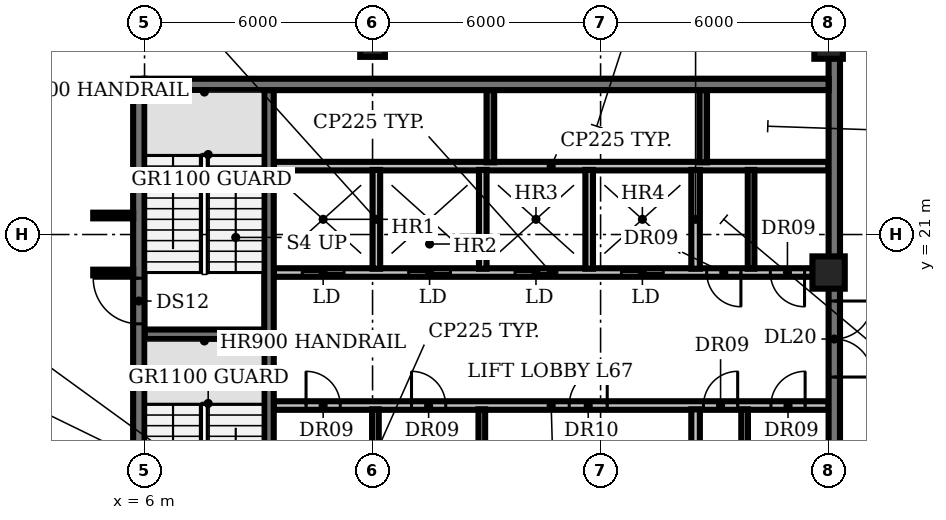
"""IFC4 building model, lengths in metres.
Left out: names, types, materials, properties, quantities, classifications, styles, units other than length and angle.
Written with IfcOpenShell. Run it as: python <this file> out.ifc"""

import sys

from ifc_helpers import new_model, si_unit, direction, frame, frame_2d, origin, origin_2d, place, context, subcontext, project, spatial, rectangle, circle, extrude, element, fill, save


model = new_model("IFC4")
c1 = context("Model", 3, precision=1e-05, world=origin(), true_north=direction((0.0, 1.0)))
c2 = subcontext(c1, "Body", "Model", "MODEL_VIEW")
j1 = project(units=[si_unit("LENGTHUNIT", "METRE"), si_unit("PLANEANGLEUNIT", "RADIAN")], contexts=[c1])
p1 = place(None, origin())
s1 = spatial("IfcSite", under=j1, at=p1, CompositionType="ELEMENT")
p2 = place(p1, origin())
s2 = spatial("IfcBuilding", under=s1, at=p2, CompositionType="ELEMENT")
p3 = place(p2, frame((0.0, 0.0, 302.0)))
s3 = spatial("IfcBuildingStorey", under=s2, at=p3, CompositionType="ELEMENT", Elevation=302.0)
p4 = place(p3, frame((12.0, 26.0, 0.0), z_axis=(0.0, 0.0, 1.0), x_axis=(1.0, 0.0, 0.0)))
e1 = element("IfcColumn", 1, at=p4, inside=s3, PredefinedType="COLUMN", context=c2, shape_type="SweptSolid", body=[
    extrude(rectangle(XDim=0.65, YDim=0.65, at=origin_2d()), origin(), (0.0, 0.0, 1.0), 3.85),
])
p5 = place(p3, frame((24.0, 20.0, 0.0), z_axis=(0.0, 0.0, 1.0), x_axis=(1.0, 0.0, 0.0)))
e2 = element("IfcColumn", 2, at=p5, inside=s3, PredefinedType="COLUMN", context=c2, shape_type="SweptSolid", body=[
    extrude(circle(Radius=0.425, at=origin_2d()), origin(), (0.0, 0.0, 1.0), 3.85),
])
p6 = place(p3, frame((24.0, 26.0, 0.0), z_axis=(0.0, 0.0, 1.0), x_axis=(1.0, 0.0, 0.0)))
e3 = element("IfcColumn", 3, at=p6, inside=s3, PredefinedType="COLUMN", context=c2, shape_type="SweptSolid", body=[
    extrude(rectangle(XDim=0.75, YDim=0.75, at=origin_2d()), origin(), (0.0, 0.0, 1.0), 3.85),
])
p7 = place(p3, frame((9.4, 16.5, 0.0), z_axis=(0.0, 0.0, 1.0), x_axis=(1.0, 0.0, 0.0)))
e4 = element("IfcWall", 4, at=p7, inside=s3, PredefinedType="PARTITIONING", context=c2, shape_type="SweptSolid", body=[
    extrude(rectangle(XDim=14.6, YDim=0.225, at=frame_2d((7.3, 0.0))), origin(), (0.0, 0.0, 1.0), 3.85),
])
p8 = place(p7, frame((0.85, 0.0, 0.0)))
e5 = element("IfcOpeningElement", 5, at=p8, cuts=e4, PredefinedType="OPENING", context=c2, shape_type="SweptSolid", body=[
    extrude(rectangle(XDim=0.9, YDim=2.1, at=frame_2d((0.45, 1.05))), frame((0.0, 0.123, 0.0), z_axis=(0.0, -1.0, 0.0), x_axis=(1.0, 0.0, 0.0)), (0.0, 0.0, 1.0), 0.245),
])
p9 = place(p7, frame((3.625, 0.0, 0.0)))
e6 = element("IfcOpeningElement", 6, at=p9, cuts=e4, PredefinedType="OPENING", context=c2, shape_type="SweptSolid", body=[
    extrude(rectangle(XDim=0.9, YDim=2.1, at=frame_2d((0.45, 1.05))), frame((0.0, 0.123, 0.0), z_axis=(0.0, -1.0, 0.0), x_axis=(1.0, 0.0, 0.0)), (0.0, 0.0, 1.0), 0.245),
])
p10 = place(p7, frame((7.775, 0.0, 0.0)))
e7 = element("IfcOpeningElement", 7, at=p10, cuts=e4, PredefinedType="OPENING", context=c2, shape_type="SweptSolid", body=[
    extrude(rectangle(XDim=1.0, YDim=2.1, at=frame_2d((0.5, 1.05))), frame((0.0, 0.123, 0.0), z_axis=(0.0, -1.0, 0.0), x_axis=(1.0, 0.0, 0.0)), (0.0, 0.0, 1.0), 0.245),
])
p11 = place(p7, frame((11.308, 0.0, 0.0)))
e8 = element("IfcOpeningElement", 8, at=p11, cuts=e4, PredefinedType="OPENING", context=c2, shape_type="SweptSolid", body=[
    extrude(rectangle(XDim=0.9, YDim=2.1, at=frame_2d((0.45, 1.05))), frame((0.0, 0.123, 0.0), z_axis=(0.0, -1.0, 0.0), x_axis=(1.0, 0.0, 0.0)), (0.0, 0.0, 1.0), 0.245),
])
p12 = place(p7, frame((13.083, 0.0, 0.0)))
e9 = element("IfcOpeningElement", 9, at=p12, cuts=e4, PredefinedType="OPENING", context=c2, shape_type="SweptSolid", body=[
    extrude(rectangle(XDim=0.9, YDim=2.1, at=frame_2d((0.45, 1.05))), frame((0.0, 0.123, 0.0), z_axis=(0.0, -1.0, 0.0), x_axis=(1.0, 0.0, 0.0)), (0.0, 0.0, 1.0), 0.245),
])
p13 = place(p3, frame((6.0, 18.375, 0.0), z_axis=(0.0, 0.0, 1.0), x_axis=(1.0, 0.0, 0.0)))
e10 = element("IfcWall", 10, at=p13, inside=s3, PredefinedType="SHEAR", context=c2, shape_type="SweptSolid", body=[
    extrude(rectangle(XDim=3.15, YDim=0.25, at=frame_2d((1.575, 0.0))), origin(), (0.0, 0.0, 1.0), 3.85),
])
p14 = place(p3, frame((24.0, 20.0, 0.0), z_axis=(0.0, 0.0, 1.0), x_axis=(-1.0, 0.0, 0.0)))
e11 = element("IfcWall", 11, at=p14, inside=s3, PredefinedType="PARTITIONING", context=c2, shape_type="SweptSolid", body=[
    extrude(rectangle(XDim=14.6, YDim=0.225, at=frame_2d((7.3, 0.0))), origin(), (0.0, 0.0, 1.0), 3.85),
])
p15 = place(p14, frame((12.75, 0.0, 0.0)))
e12 = element("IfcOpeningElement", 12, at=p15, cuts=e11, PredefinedType="OPENING", context=c2, shape_type="SweptSolid", body=[
    extrude(rectangle(XDim=1.1, YDim=2.1, at=frame_2d((0.55, 1.05))), frame((0.0, 0.123, 0.0), z_axis=(0.0, -1.0, 0.0), x_axis=(1.0, 0.0, 0.0)), (0.0, 0.0, 1.0), 0.245),
])
p16 = place(p14, frame((9.95, 0.0, 0.0)))
e13 = element("IfcOpeningElement", 13, at=p16, cuts=e11, PredefinedType="OPENING", context=c2, shape_type="SweptSolid", body=[
    extrude(rectangle(XDim=1.1, YDim=2.1, at=frame_2d((0.55, 1.05))), frame((0.0, 0.123, 0.0), z_axis=(0.0, -1.0, 0.0), x_axis=(1.0, 0.0, 0.0)), (0.0, 0.0, 1.0), 0.245),
])
p17 = place(p14, frame((7.15, 0.0, 0.0)))
e14 = element("IfcOpeningElement", 14, at=p17, cuts=e11, PredefinedType="OPENING", context=c2, shape_type="SweptSolid", body=[
    extrude(rectangle(XDim=1.1, YDim=2.1, at=frame_2d((0.55, 1.05))), frame((0.0, 0.123, 0.0), z_axis=(0.0, -1.0, 0.0), x_axis=(1.0, 0.0, 0.0)), (0.0, 0.0, 1.0), 0.245),
])
p18 = place(p14, frame((4.35, 0.0, 0.0)))
e15 = element("IfcOpeningElement", 15, at=p18, cuts=e11, PredefinedType="OPENING", context=c2, shape_type="SweptSolid", body=[
    extrude(rectangle(XDim=1.1, YDim=2.1, at=frame_2d((0.55, 1.05))), frame((0.0, 0.123, 0.0), z_axis=(0.0, -1.0, 0.0), x_axis=(1.0, 0.0, 0.0)), (0.0, 0.0, 1.0), 0.245),
])
p19 = place(p14, frame((2.308, 0.0, 0.0)))
e16 = element("IfcOpeningElement", 16, at=p19, cuts=e11, PredefinedType="OPENING", context=c2, shape_type="SweptSolid", body=[
    extrude(rectangle(XDim=0.9, YDim=2.1, at=frame_2d((0.45, 1.05))), frame((0.0, 0.123, 0.0), z_axis=(0.0, -1.0, 0.0), x_axis=(1.0, 0.0, 0.0)), (0.0, 0.0, 1.0), 0.245),
])
p20 = place(p14, frame((0.633, 0.0, 0.0)))
e17 = element("IfcOpeningElement", 17, at=p20, cuts=e11, PredefinedType="OPENING", context=c2, shape_type="SweptSolid", body=[
    extrude(rectangle(XDim=0.9, YDim=2.1, at=frame_2d((0.45, 1.05))), frame((0.0, 0.123, 0.0), z_axis=(0.0, -1.0, 0.0), x_axis=(1.0, 0.0, 0.0)), (0.0, 0.0, 1.0), 0.245),
])
p21 = place(p3, frame((9.4, 22.8, 0.0), z_axis=(0.0, 0.0, 1.0), x_axis=(1.0, 0.0, 0.0)))
e18 = element("IfcWall", 18, at=p21, inside=s3, PredefinedType="PARTITIONING", context=c2, shape_type="SweptSolid", body=[
    extrude(rectangle(XDim=14.6, YDim=0.225, at=frame_2d((7.3, 0.0))), origin(), (0.0, 0.0, 1.0), 3.85),
])
p22 = place(p3, frame((9.275, 18.375, 0.0), z_axis=(0.0, 0.0, 1.0), x_axis=(0.0, -1.0, 0.0)))
e19 = element("IfcWall", 19, at=p22, inside=s3, PredefinedType="SHEAR", context=c2, shape_type="SweptSolid", body=[
    extrude(rectangle(XDim=6.55, YDim=0.25, at=frame_2d((3.275, 0.0))), origin(), (0.0, 0.0, 1.0), 3.85),
])
p23 = place(p22, frame((5.075, 0.0, 0.0)))
e20 = element("IfcOpeningElement", 20, at=p23, cuts=e19, PredefinedType="OPENING", context=c2, shape_type="SweptSolid", body=[
    extrude(rectangle(XDim=1.0, YDim=2.1, at=frame_2d((0.5, 1.05))), frame((0.0, 0.135, 0.0), z_axis=(0.0, -1.0, 0.0), x_axis=(1.0, 0.0, 0.0)), (0.0, 0.0, 1.0), 0.27),
])
p24 = place(p3, frame((9.275, 18.375, 0.0), z_axis=(0.0, 0.0, 1.0), x_axis=(0.0, 1.0, 0.0)))
e21 = element("IfcWall", 21, at=p24, inside=s3, PredefinedType="SHEAR", context=c2, shape_type="SweptSolid", body=[
    extrude(rectangle(XDim=6.425, YDim=0.25, at=frame_2d((3.212, 0.0))), origin(), (0.0, 0.0, 1.0), 3.85),
])
p25 = place(p3, frame((12.075, 13.8, 0.0), z_axis=(0.0, 0.0, 1.0), x_axis=(0.0, 1.0, 0.0)))
e22 = element("IfcWall", 22, at=p25, inside=s3, PredefinedType="PARTITIONING", context=c2, shape_type="SweptSolid", body=[
    extrude(rectangle(XDim=2.6, YDim=0.175, at=frame_2d((1.3, 0.0))), origin(), (0.0, 0.0, 1.0), 3.85),
])
p26 = place(p3, frame((12.1, 20.1, 0.0), z_axis=(0.0, 0.0, 1.0), x_axis=(0.0, 1.0, 0.0)))
e23 = element("IfcWall", 23, at=p26, inside=s3, PredefinedType="SOLIDWALL", context=c2, shape_type="SweptSolid", body=[
    extrude(rectangle(XDim=2.6, YDim=0.2, at=frame_2d((1.3, 0.0))), origin(), (0.0, 0.0, 1.0), 3.85),
])
p27 = place(p3, frame((14.875, 13.8, 0.0), z_axis=(0.0, 0.0, 1.0), x_axis=(0.0, 1.0, 0.0)))
e24 = element("IfcWall", 24, at=p27, inside=s3, PredefinedType="PARTITIONING", context=c2, shape_type="SweptSolid", body=[
    extrude(rectangle(XDim=2.6, YDim=0.175, at=frame_2d((1.3, 0.0))), origin(), (0.0, 0.0, 1.0), 3.85),
])
p28 = place(p3, frame((14.9, 20.1, 0.0), z_axis=(0.0, 0.0, 1.0), x_axis=(0.0, 1.0, 0.0)))
e25 = element("IfcWall", 25, at=p28, inside=s3, PredefinedType="SOLIDWALL", context=c2, shape_type="SweptSolid", body=[
    extrude(rectangle(XDim=2.6, YDim=0.2, at=frame_2d((1.3, 0.0))), origin(), (0.0, 0.0, 1.0), 3.85),
])
p29 = place(p3, frame((15.1, 22.9, 0.0), z_axis=(0.0, 0.0, 1.0), x_axis=(0.0, 1.0, 0.0)))
e26 = element("IfcWall", 26, at=p29, inside=s3, PredefinedType="SHEAR", context=c2, shape_type="SweptSolid", body=[
    extrude(rectangle(XDim=1.9, YDim=0.2, at=frame_2d((0.95, 0.0))), origin(), (0.0, 0.0, 1.0), 3.85),
])
p30 = place(p3, frame((17.7, 20.1, 0.0), z_axis=(0.0, 0.0, 1.0), x_axis=(0.0, 1.0, 0.0)))
e27 = element("IfcWall", 27, at=p30, inside=s3, PredefinedType="SOLIDWALL", context=c2, shape_type="SweptSolid", body=[
    extrude(rectangle(XDim=2.6, YDim=0.2, at=frame_2d((1.3, 0.0))), origin(), (0.0, 0.0, 1.0), 3.85),
])
for number, where, z_axis, x_axis in (
    (28, (20.5, 13.8, 0.0), (0.0, 0.0, 1.0), (0.0, 1.0, 0.0)),
    (29, (20.5, 20.1, 0.0), (0.0, 0.0, 1.0), (0.0, 1.0, 0.0)),
):
    element("IfcWall", number, at=place(p3, frame(where, z_axis=z_axis, x_axis=x_axis)), inside=s3, PredefinedType="PARTITIONING", context=c2, shape_type="SweptSolid", body=[
        extrude(rectangle(XDim=2.6, YDim=0.225, at=frame_2d((1.3, 0.0))), origin(), (0.0, 0.0, 1.0), 3.85),
    ])
p31 = place(p3, frame((20.7, 22.9, 0.0), z_axis=(0.0, 0.0, 1.0), x_axis=(0.0, 1.0, 0.0)))
e30 = element("IfcWall", 30, at=p31, inside=s3, PredefinedType="SHEAR", context=c2, shape_type="SweptSolid", body=[
    extrude(rectangle(XDim=1.9, YDim=0.2, at=frame_2d((0.95, 0.0))), origin(), (0.0, 0.0, 1.0), 3.85),
])
for number, where, z_axis, x_axis in (
    (31, (21.79, 13.8, 0.0), (0.0, 0.0, 1.0), (0.0, 1.0, 0.0)),
    (32, (21.96, 20.1, 0.0), (0.0, 0.0, 1.0), (0.0, 1.0, 0.0)),
):
    element("IfcWall", number, at=place(p3, frame(where, z_axis=z_axis, x_axis=x_axis)), inside=s3, PredefinedType="PARTITIONING", context=c2, shape_type="SweptSolid", body=[
        extrude(rectangle(XDim=2.6, YDim=0.175, at=frame_2d((1.3, 0.0))), origin(), (0.0, 0.0, 1.0), 3.85),
    ])
p32 = place(p3, frame((5.85, 5.1, 0.0), z_axis=(0.0, 0.0, 1.0), x_axis=(0.0, 1.0, 0.0)))
e33 = element("IfcWall", 33, at=p32, inside=s3, PredefinedType="SHEAR", context=c2, shape_type="SweptSolid", body=[
    extrude(rectangle(XDim=20.0, YDim=0.3, at=frame_2d((10.0, 0.0))), origin(), (0.0, 0.0, 1.0), 3.85),
])
p33 = place(p32, frame((0.55, 0.0, 0.0)))
e34 = element("IfcOpeningElement", 34, at=p33, cuts=e33, PredefinedType="OPENING", context=c2, shape_type="SweptSolid", body=[
    extrude(rectangle(XDim=1.5, YDim=2.1, at=frame_2d((0.75, 1.05))), frame((0.0, 0.16, 0.0), z_axis=(0.0, -1.0, 0.0), x_axis=(1.0, 0.0, 0.0)), (0.0, 0.0, 1.0), 0.32),
])
p34 = place(p32, frame((7.0, 0.0, 0.0)))
e35 = element("IfcOpeningElement", 35, at=p34, cuts=e33, PredefinedType="OPENING", context=c2, shape_type="SweptSolid", body=[
    extrude(rectangle(XDim=1.2, YDim=2.1, at=frame_2d((0.6, 1.05))), frame((0.0, 0.16, 0.0), z_axis=(0.0, -1.0, 0.0), x_axis=(1.0, 0.0, 0.0)), (0.0, 0.0, 1.0), 0.32),
])
p35 = place(p32, frame((13.55, 0.0, 0.0)))
e36 = element("IfcOpeningElement", 36, at=p35, cuts=e33, PredefinedType="OPENING", context=c2, shape_type="SweptSolid", body=[
    extrude(rectangle(XDim=1.2, YDim=2.1, at=frame_2d((0.6, 1.05))), frame((0.0, 0.16, 0.0), z_axis=(0.0, -1.0, 0.0), x_axis=(1.0, 0.0, 0.0)), (0.0, 0.0, 1.0), 0.32),
])
p36 = place(p3, frame((24.15, 25.655, 0.0), z_axis=(0.0, 0.0, 1.0), x_axis=(0.0, -1.0, 0.0)))
e37 = element("IfcWall", 37, at=p36, inside=s3, PredefinedType="SHEAR", context=c2, shape_type="SweptSolid", body=[
    extrude(rectangle(XDim=20.555, YDim=0.3, at=frame_2d((10.277, 0.0))), origin(), (0.0, 0.0, 1.0), 3.85),
])
p37 = place(p36, frame((18.505, 0.0, 0.0)))
e38 = element("IfcOpeningElement", 38, at=p37, cuts=e37, PredefinedType="OPENING", context=c2, shape_type="SweptSolid", body=[
    extrude(rectangle(XDim=1.5, YDim=2.1, at=frame_2d((0.75, 1.05))), frame((0.0, 0.16, 0.0), z_axis=(0.0, -1.0, 0.0), x_axis=(1.0, 0.0, 0.0)), (0.0, 0.0, 1.0), 0.32),
])
p38 = place(p36, frame((12.405, 0.0, 0.0)))
e39 = element("IfcOpeningElement", 39, at=p38, cuts=e37, PredefinedType="OPENING", context=c2, shape_type="SweptSolid", body=[
    extrude(rectangle(XDim=0.9, YDim=2.1, at=frame_2d((0.45, 1.05))), frame((0.0, 0.16, 0.0), z_axis=(0.0, -1.0, 0.0), x_axis=(1.0, 0.0, 0.0)), (0.0, 0.0, 1.0), 0.32),
])
p39 = place(p36, frame((6.405, 0.0, 0.0)))
e40 = element("IfcOpeningElement", 40, at=p39, cuts=e37, PredefinedType="OPENING", context=c2, shape_type="SweptSolid", body=[
    extrude(rectangle(XDim=2.0, YDim=2.1, at=frame_2d((1.0, 1.05))), frame((0.0, 0.16, 0.0), z_axis=(0.0, -1.0, 0.0), x_axis=(1.0, 0.0, 0.0)), (0.0, 0.0, 1.0), 0.32),
])
p40 = place(p3, frame((6.0, 24.95, 0.0), z_axis=(0.0, 0.0, 1.0), x_axis=(1.0, 0.0, 0.0)))
e41 = element("IfcWall", 41, at=p40, inside=s3, PredefinedType="SHEAR", context=c2, shape_type="SweptSolid", body=[
    extrude(rectangle(XDim=18.0, YDim=0.3, at=frame_2d((9.0, 0.0))), origin(), (0.0, 0.0, 1.0), 3.85),
])
for number, where, z_axis, x_axis in (
    (42, (4.65, 20.0, 0.0), (0.0, 0.0, 1.0), (1.0, 0.0, 0.0)),
    (43, (4.65, 21.5, 0.0), (0.0, 0.0, 1.0), (1.0, 0.0, 0.0)),
):
    element("IfcWall", number, at=place(p3, frame(where, z_axis=z_axis, x_axis=x_axis)), inside=s3, PredefinedType="PARTITIONING", context=c2, shape_type="SweptSolid", body=[
        extrude(rectangle(XDim=1.05, YDim=0.15, at=frame_2d((0.525, 0.0))), origin(), (0.0, 0.0, 1.0), 2.9),
    ])
p41 = place(p8, origin())
e44 = element("IfcDoor", 44, at=p41, inside=s3, OperationType="SINGLE_SWING_LEFT", PredefinedType="DOOR", context=c2, shape_type="SweptSolid", body=[
    extrude(rectangle(XDim=0.9, YDim=2.1, at=frame_2d((0.45, 1.05))), frame((0.0, 0.025, 0.0), z_axis=(0.0, -1.0, 0.0), x_axis=(1.0, 0.0, 0.0)), (0.0, 0.0, 1.0), 0.05),
])
fill(e5, e44)
p42 = place(p9, origin())
e45 = element("IfcDoor", 45, at=p42, inside=s3, OperationType="SINGLE_SWING_LEFT", PredefinedType="DOOR", context=c2, shape_type="SweptSolid", body=[
    extrude(rectangle(XDim=0.9, YDim=2.1, at=frame_2d((0.45, 1.05))), frame((0.0, 0.025, 0.0), z_axis=(0.0, -1.0, 0.0), x_axis=(1.0, 0.0, 0.0)), (0.0, 0.0, 1.0), 0.05),
])
fill(e6, e45)
p43 = place(p10, origin())
e46 = element("IfcDoor", 46, at=p43, inside=s3, OperationType="SINGLE_SWING_RIGHT", PredefinedType="DOOR", context=c2, shape_type="SweptSolid", body=[
    extrude(rectangle(XDim=1.0, YDim=2.1, at=frame_2d((0.5, 1.05))), frame((0.0, 0.025, 0.0), z_axis=(0.0, -1.0, 0.0), x_axis=(1.0, 0.0, 0.0)), (0.0, 0.0, 1.0), 0.05),
])
fill(e7, e46)
p44 = place(p11, origin())
e47 = element("IfcDoor", 47, at=p44, inside=s3, OperationType="SINGLE_SWING_RIGHT", PredefinedType="DOOR", context=c2, shape_type="SweptSolid", body=[
    extrude(rectangle(XDim=0.9, YDim=2.1, at=frame_2d((0.45, 1.05))), frame((0.0, 0.025, 0.0), z_axis=(0.0, -1.0, 0.0), x_axis=(1.0, 0.0, 0.0)), (0.0, 0.0, 1.0), 0.05),
])
fill(e8, e47)
p45 = place(p12, origin())
e48 = element("IfcDoor", 48, at=p45, inside=s3, OperationType="SINGLE_SWING_RIGHT", PredefinedType="DOOR", context=c2, shape_type="SweptSolid", body=[
    extrude(rectangle(XDim=0.9, YDim=2.1, at=frame_2d((0.45, 1.05))), frame((0.0, 0.025, 0.0), z_axis=(0.0, -1.0, 0.0), x_axis=(1.0, 0.0, 0.0)), (0.0, 0.0, 1.0), 0.05),
])
fill(e9, e48)
p46 = place(p15, origin())
e49 = element("IfcDoor", 49, at=p46, inside=s3, OperationType="DOUBLE_DOOR_SLIDING", PredefinedType="DOOR", context=c2, shape_type="SweptSolid", body=[
    extrude(rectangle(XDim=1.1, YDim=2.1, at=frame_2d((0.55, 1.05))), frame((0.0, 0.025, 0.0), z_axis=(0.0, -1.0, 0.0), x_axis=(1.0, 0.0, 0.0)), (0.0, 0.0, 1.0), 0.05),
])
fill(e12, e49)
p47 = place(p16, origin())
e50 = element("IfcDoor", 50, at=p47, inside=s3, OperationType="DOUBLE_DOOR_SLIDING", PredefinedType="DOOR", context=c2, shape_type="SweptSolid", body=[
    extrude(rectangle(XDim=1.1, YDim=2.1, at=frame_2d((0.55, 1.05))), frame((0.0, 0.025, 0.0), z_axis=(0.0, -1.0, 0.0), x_axis=(1.0, 0.0, 0.0)), (0.0, 0.0, 1.0), 0.05),
])
fill(e13, e50)
p48 = place(p17, origin())
e51 = element("IfcDoor", 51, at=p48, inside=s3, OperationType="DOUBLE_DOOR_SLIDING", PredefinedType="DOOR", context=c2, shape_type="SweptSolid", body=[
    extrude(rectangle(XDim=1.1, YDim=2.1, at=frame_2d((0.55, 1.05))), frame((0.0, 0.025, 0.0), z_axis=(0.0, -1.0, 0.0), x_axis=(1.0, 0.0, 0.0)), (0.0, 0.0, 1.0), 0.05),
])
fill(e14, e51)
p49 = place(p18, origin())
e52 = element("IfcDoor", 52, at=p49, inside=s3, OperationType="DOUBLE_DOOR_SLIDING", PredefinedType="DOOR", context=c2, shape_type="SweptSolid", body=[
    extrude(rectangle(XDim=1.1, YDim=2.1, at=frame_2d((0.55, 1.05))), frame((0.0, 0.025, 0.0), z_axis=(0.0, -1.0, 0.0), x_axis=(1.0, 0.0, 0.0)), (0.0, 0.0, 1.0), 0.05),
])
fill(e15, e52)
p50 = place(p19, origin())
e53 = element("IfcDoor", 53, at=p50, inside=s3, OperationType="SINGLE_SWING_LEFT", PredefinedType="DOOR", context=c2, shape_type="SweptSolid", body=[
    extrude(rectangle(XDim=0.9, YDim=2.1, at=frame_2d((0.45, 1.05))), frame((0.0, 0.025, 0.0), z_axis=(0.0, -1.0, 0.0), x_axis=(1.0, 0.0, 0.0)), (0.0, 0.0, 1.0), 0.05),
])
fill(e16, e53)
p51 = place(p20, origin())
e54 = element("IfcDoor", 54, at=p51, inside=s3, OperationType="SINGLE_SWING_LEFT", PredefinedType="DOOR", context=c2, shape_type="SweptSolid", body=[
    extrude(rectangle(XDim=0.9, YDim=2.1, at=frame_2d((0.45, 1.05))), frame((0.0, 0.025, 0.0), z_axis=(0.0, -1.0, 0.0), x_axis=(1.0, 0.0, 0.0)), (0.0, 0.0, 1.0), 0.05),
])
fill(e17, e54)
p52 = place(p35, origin())
e55 = element("IfcDoor", 55, at=p52, inside=s3, OperationType="SINGLE_SWING_RIGHT", PredefinedType="DOOR", context=c2, shape_type="SweptSolid", body=[
    extrude(rectangle(XDim=1.2, YDim=2.1, at=frame_2d((0.6, 1.05))), frame((0.0, 0.025, 0.0), z_axis=(0.0, -1.0, 0.0), x_axis=(1.0, 0.0, 0.0)), (0.0, 0.0, 1.0), 0.05),
])
fill(e36, e55)
p53 = place(p39, origin())
e56 = element("IfcDoor", 56, at=p53, inside=s3, OperationType="DOUBLE_DOOR_SINGLE_SWING", PredefinedType="DOOR", context=c2, shape_type="SweptSolid", body=[
    extrude(rectangle(XDim=2.0, YDim=2.1, at=frame_2d((1.0, 1.05))), frame((0.0, 0.025, 0.0), z_axis=(0.0, -1.0, 0.0), x_axis=(1.0, 0.0, 0.0)), (0.0, 0.0, 1.0), 0.05),
])
fill(e40, e56)
save(model, sys.argv[1])
